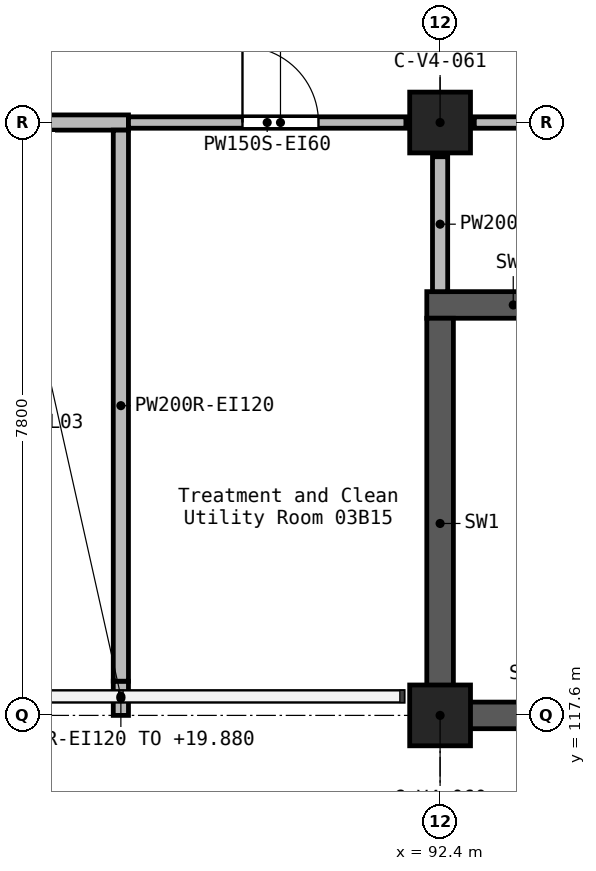
"""IFC4 building model, lengths in metres.
Left out: names, types, materials, properties, quantities, classifications, styles, units other than length and angle.
Written with IfcOpenShell. Run it as: python <this file> out.ifc"""

import sys

from ifc_helpers import new_model, si_unit, direction, frame, frame_2d, origin, origin_2d, place, context, subcontext, project, spatial, rectangle, extrude, element, fill, save


model = new_model("IFC4")
c1 = context("Model", 3, precision=1e-05, world=origin(), true_north=direction((0.0, 1.0)))
c2 = subcontext(c1, "Body", "Model", "MODEL_VIEW")
j1 = project(units=[si_unit("LENGTHUNIT", "METRE"), si_unit("PLANEANGLEUNIT", "RADIAN")], contexts=[c1])
p1 = place(None, origin())
s1 = spatial("IfcSite", under=j1, at=p1, CompositionType="ELEMENT")
p2 = place(p1, origin())
s2 = spatial("IfcBuilding", under=s1, at=p2, CompositionType="ELEMENT")
p3 = place(p2, frame((0.0, 0.0, 16.8)))
s3 = spatial("IfcBuildingStorey", under=s2, at=p3, CompositionType="ELEMENT", Elevation=16.8)
for number, where, z_axis, x_axis in (
    (1, (92.4, 117.6, 0.0), (0.0, 0.0, 1.0), (1.0, 0.0, 0.0)),
    (2, (92.4, 125.4, 0.0), (0.0, 0.0, 1.0), (1.0, 0.0, 0.0)),
):
    element("IfcColumn", number, at=place(p3, frame(where, z_axis=z_axis, x_axis=x_axis)), inside=s3, PredefinedType="COLUMN", context=c2, shape_type="SweptSolid", body=[
        extrude(rectangle(XDim=0.8, YDim=0.8, at=origin_2d()), origin(), (0.0, 0.0, 1.0), 4.2),
    ])
p4 = place(p3, frame((92.225, 123.0, 0.0), z_axis=(0.0, 0.0, 1.0), x_axis=(1.0, 0.0, 0.0)))
e3 = element("IfcWall", 3, at=p4, inside=s3, PredefinedType="SHEAR", context=c2, shape_type="SweptSolid", body=[
    extrude(rectangle(XDim=2.275, YDim=0.35, at=frame_2d((1.137, 0.0))), origin(), (0.0, 0.0, 1.0), 3.9),
])
p5 = place(p3, frame((92.4, 117.425, 0.0), z_axis=(0.0, 0.0, 1.0), x_axis=(0.0, 1.0, 0.0)))
e4 = element("IfcWall", 4, at=p5, inside=s3, PredefinedType="SHEAR", context=c2, shape_type="SweptSolid", body=[
    extrude(rectangle(XDim=5.4, YDim=0.35, at=frame_2d((2.7, 0.0))), origin(), (0.0, 0.0, 1.0), 3.9),
])
p6 = place(p3, frame((92.575, 117.6, 0.0), z_axis=(0.0, 0.0, 1.0), x_axis=(1.0, 0.0, 0.0)))
e5 = element("IfcWall", 5, at=p6, inside=s3, PredefinedType="SHEAR", context=c2, shape_type="SweptSolid", body=[
    extrude(rectangle(XDim=1.925, YDim=0.35, at=frame_2d((0.962, 0.0))), origin(), (0.0, 0.0, 1.0), 3.9),
])
p7 = place(p3, frame((84.45, 125.4, 0.0), z_axis=(0.0, 0.0, 1.0), x_axis=(1.0, 0.0, 0.0)))
e6 = element("IfcWall", 6, at=p7, inside=s3, PredefinedType="SOLIDWALL", context=c2, shape_type="SweptSolid", body=[
    extrude(rectangle(XDim=3.85, YDim=0.2, at=frame_2d((1.925, 0.0))), origin(), (0.0, 0.0, 1.0), 3.9),
])
p8 = place(p7, frame((1.15, 0.0, 0.0)))
e7 = element("IfcOpeningElement", 7, at=p8, cuts=e6, PredefinedType="OPENING", context=c2, shape_type="SweptSolid", body=[
    extrude(rectangle(XDim=1.0, YDim=2.1, at=frame_2d((0.5, 1.05))), frame((0.0, 0.11, 0.0), z_axis=(0.0, -1.0, 0.0), x_axis=(1.0, 0.0, 0.0)), (0.0, 0.0, 1.0), 0.22),
])
p9 = place(p3, frame((88.2, 117.6, 0.0), z_axis=(0.0, 0.0, 1.0), x_axis=(0.0, 1.0, 0.0)))
e8 = element("IfcWall", 8, at=p9, inside=s3, PredefinedType="SOLIDWALL", context=c2, shape_type="SweptSolid", body=[
    extrude(rectangle(XDim=0.45, YDim=0.2, at=frame_2d((0.225, 0.0))), origin(), (0.0, 0.0, 1.0), 3.08),
])
p10 = place(p3, frame((88.2, 118.05, 0.0), z_axis=(0.0, 0.0, 1.0), x_axis=(0.0, 1.0, 0.0)))
e9 = element("IfcWall", 9, at=p10, inside=s3, PredefinedType="SOLIDWALL", context=c2, shape_type="SweptSolid", body=[
    extrude(rectangle(XDim=7.25, YDim=0.2, at=frame_2d((3.625, 0.0))), origin(), (0.0, 0.0, 1.0), 3.9),
])
p11 = place(p3, frame((92.4, 123.175, 0.0), z_axis=(0.0, 0.0, 1.0), x_axis=(0.0, 1.0, 0.0)))
e10 = element("IfcWall", 10, at=p11, inside=s3, PredefinedType="SOLIDWALL", context=c2, shape_type="SweptSolid", body=[
    extrude(rectangle(XDim=1.775, YDim=0.2, at=frame_2d((0.887, 0.0))), origin(), (0.0, 0.0, 1.0), 3.9),
])
p12 = place(p3, frame((92.85, 125.4, 0.0), z_axis=(0.0, 0.0, 1.0), x_axis=(1.0, 0.0, 0.0)))
e11 = element("IfcWall", 11, at=p12, inside=s3, PredefinedType="PARTITIONING", context=c2, shape_type="SweptSolid", body=[
    extrude(rectangle(XDim=7.5, YDim=0.15, at=frame_2d((3.75, 0.0))), origin(), (0.0, 0.0, 1.0), 3.9),
])
p13 = place(p12, frame((3.25, 0.0, 0.0)))
e12 = element("IfcOpeningElement", 12, at=p13, cuts=e11, PredefinedType="OPENING", context=c2, shape_type="SweptSolid", body=[
    extrude(rectangle(XDim=1.0, YDim=2.1, at=frame_2d((0.5, 1.05))), frame((0.0, 0.085, 0.0), z_axis=(0.0, -1.0, 0.0), x_axis=(1.0, 0.0, 0.0)), (0.0, 0.0, 1.0), 0.17),
])
p14 = place(p3, frame((88.3, 125.4, 0.0), z_axis=(0.0, 0.0, 1.0), x_axis=(1.0, 0.0, 0.0)))
e13 = element("IfcWall", 13, at=p14, inside=s3, PredefinedType="PARTITIONING", context=c2, shape_type="SweptSolid", body=[
    extrude(rectangle(XDim=3.65, YDim=0.15, at=frame_2d((1.825, 0.0))), origin(), (0.0, 0.0, 1.0), 3.9),
])
p15 = place(p14, frame((1.5, 0.0, 0.0)))
e14 = element("IfcOpeningElement", 14, at=p15, cuts=e13, PredefinedType="OPENING", context=c2, shape_type="SweptSolid", body=[
    extrude(rectangle(XDim=1.0, YDim=2.1, at=frame_2d((0.5, 1.05))), frame((0.0, 0.085, 0.0), z_axis=(0.0, -1.0, 0.0), x_axis=(1.0, 0.0, 0.0)), (0.0, 0.0, 1.0), 0.17),
])
p16 = place(p15, frame((1.0, 0.0, 0.0), z_axis=(0.0, 0.0, 1.0), x_axis=(-1.0, 0.0, 0.0)))
e15 = element("IfcDoor", 15, at=p16, inside=s3, OperationType="SINGLE_SWING_LEFT", PredefinedType="DOOR", context=c2, shape_type="SweptSolid", body=[
    extrude(rectangle(XDim=1.0, YDim=2.1, at=frame_2d((0.5, 1.05))), frame((0.0, 0.025, 0.0), z_axis=(0.0, -1.0, 0.0), x_axis=(1.0, 0.0, 0.0)), (0.0, 0.0, 1.0), 0.05),
])
fill(e14, e15)
save(model, sys.argv[1])
